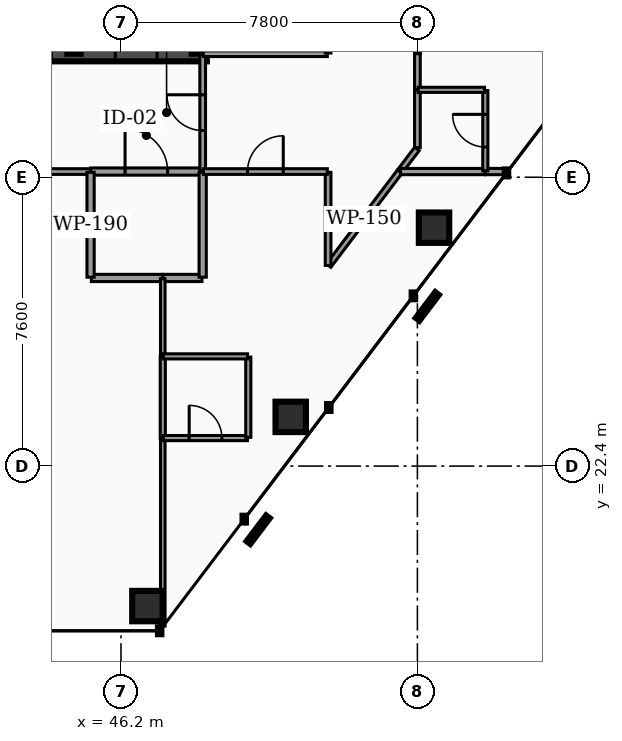
"""IFC4 building model, lengths in metres.
Left out: names, types, materials, properties, quantities, classifications, styles, units other than length and angle.
Written with IfcOpenShell. Run it as: python <this file> out.ifc"""

import sys

from ifc_helpers import new_model, si_unit, direction, frame, frame_2d, origin, origin_2d, place, context, subcontext, project, spatial, rectangle, hollow_rectangle, extrude, element, fill, save


model = new_model("IFC4")
c1 = context("Model", 3, precision=1e-05, world=origin(), true_north=direction((0.0, 1.0)))
c2 = subcontext(c1, "Body", "Model", "MODEL_VIEW")
j1 = project(units=[si_unit("LENGTHUNIT", "METRE"), si_unit("PLANEANGLEUNIT", "RADIAN")], contexts=[c1])
p1 = place(None, origin())
s1 = spatial("IfcSite", under=j1, at=p1, CompositionType="ELEMENT")
p2 = place(p1, origin())
s2 = spatial("IfcBuilding", under=s1, at=p2, CompositionType="ELEMENT")
p3 = place(p2, frame((0.0, 0.0, 127.16)))
s3 = spatial("IfcBuildingStorey", under=s2, at=p3, CompositionType="ELEMENT", Elevation=127.16)
p4 = place(p3, frame((28.4, 33.25, 0.0), z_axis=(0.0, 0.0, 1.0), x_axis=(1.0, 0.0, 0.0)))
e1 = element("IfcWall", 1, at=p4, inside=s3, PredefinedType="SHEAR", context=c2, shape_type="SweptSolid", body=[
    extrude(rectangle(XDim=20.06, YDim=0.4, at=frame_2d((10.03, 0.0))), origin(), (0.0, 0.0, 1.0), 3.5),
])
p5 = place(p4, frame((4.03, 0.0, 0.0)))
e2 = element("IfcOpeningElement", 2, at=p5, cuts=e1, PredefinedType="OPENING", context=c2, shape_type="SweptSolid", body=[
    extrude(rectangle(XDim=1.1, YDim=2.15, at=frame_2d((0.55, 1.075))), frame((0.0, 0.21, 0.0), z_axis=(0.0, -1.0, 0.0), x_axis=(1.0, 0.0, 0.0)), (0.0, 0.0, 1.0), 0.42),
])
p6 = place(p4, frame((14.87, 0.0, 0.0)))
e3 = element("IfcOpeningElement", 3, at=p6, cuts=e1, PredefinedType="OPENING", context=c2, shape_type="SweptSolid", body=[
    extrude(rectangle(XDim=1.1, YDim=2.15, at=frame_2d((0.55, 1.075))), frame((0.0, 0.21, 0.0), z_axis=(0.0, -1.0, 0.0), x_axis=(1.0, 0.0, 0.0)), (0.0, 0.0, 1.0), 0.42),
])
p7 = place(p4, frame((5.95, 0.0, 0.0)))
e4 = element("IfcOpeningElement", 4, at=p7, cuts=e1, PredefinedType="OPENING", context=c2, shape_type="SweptSolid", body=[
    extrude(rectangle(XDim=1.0, YDim=2.1, at=frame_2d((0.5, 1.05))), frame((0.0, 0.21, 0.0), z_axis=(0.0, -1.0, 0.0), x_axis=(1.0, 0.0, 0.0)), (0.0, 0.0, 1.0), 0.42),
])
p8 = place(p4, frame((7.65, 0.0, 0.0)))
e5 = element("IfcOpeningElement", 5, at=p8, cuts=e1, PredefinedType="OPENING", context=c2, shape_type="SweptSolid", body=[
    extrude(rectangle(XDim=1.0, YDim=2.1, at=frame_2d((0.5, 1.05))), frame((0.0, 0.21, 0.0), z_axis=(0.0, -1.0, 0.0), x_axis=(1.0, 0.0, 0.0)), (0.0, 0.0, 1.0), 0.42),
])
p9 = place(p4, frame((1.31, 0.0, 0.0)))
e6 = element("IfcOpeningElement", 6, at=p9, cuts=e1, PredefinedType="OPENING", context=c2, shape_type="SweptSolid", body=[
    extrude(rectangle(XDim=1.1, YDim=2.2, at=frame_2d((0.55, 1.1))), frame((0.0, 0.21, 0.0), z_axis=(0.0, -1.0, 0.0), x_axis=(1.0, 0.0, 0.0)), (0.0, 0.0, 1.0), 0.42),
])
p10 = place(p4, frame((9.44, 0.0, 0.0)))
e7 = element("IfcOpeningElement", 7, at=p10, cuts=e1, PredefinedType="OPENING", context=c2, shape_type="SweptSolid", body=[
    extrude(rectangle(XDim=1.12, YDim=2.05, at=frame_2d((0.56, 1.025))), frame((0.0, 0.21, 0.0), z_axis=(0.0, -1.0, 0.0), x_axis=(1.0, 0.0, 0.0)), (0.0, 0.0, 1.0), 0.42),
])
p11 = place(p4, frame((17.65, 0.0, 0.0)))
e8 = element("IfcOpeningElement", 8, at=p11, cuts=e1, PredefinedType="OPENING", context=c2, shape_type="SweptSolid", body=[
    extrude(rectangle(XDim=1.1, YDim=2.2, at=frame_2d((0.55, 1.1))), frame((0.0, 0.21, 0.0), z_axis=(0.0, -1.0, 0.0), x_axis=(1.0, 0.0, 0.0)), (0.0, 0.0, 1.0), 0.42),
])
p12 = place(p3, frame((44.965, 33.25, 0.0), z_axis=(0.0, 0.0, 1.0), x_axis=(0.0, 1.0, 0.0)))
e9 = element("IfcWall", 9, at=p12, inside=s3, PredefinedType="SHEAR", context=c2, shape_type="SweptSolid", body=[
    extrude(rectangle(XDim=10.2, YDim=0.35, at=frame_2d((5.1, 0.0))), origin(), (0.0, 0.0, 1.0), 3.5),
])
p13 = place(p3, frame((48.26, 33.25, 0.0), z_axis=(0.0, 0.0, 1.0), x_axis=(0.0, 1.0, 0.0)))
e10 = element("IfcWall", 10, at=p13, inside=s3, PredefinedType="SHEAR", context=c2, shape_type="SweptSolid", body=[
    extrude(rectangle(XDim=10.2, YDim=0.4, at=frame_2d((5.1, 0.0))), origin(), (0.0, 0.0, 1.0), 3.5),
])
for number, where, z_axis, x_axis in (
    (11, (46.895, 18.716, 0.0), (0.0, 0.0, 1.0), (1.0, 0.0, 0.0)),
    (12, (50.666, 23.695, 0.0), (0.0, 0.0, 1.0), (1.0, 0.0, 0.0)),
    (13, (54.438, 28.673, 0.0), (0.0, 0.0, 1.0), (1.0, 0.0, 0.0)),
):
    element("IfcColumn", number, at=place(p3, frame(where, z_axis=z_axis, x_axis=x_axis)), inside=s3, PredefinedType="COLUMN", context=c2, shape_type="SweptSolid", body=[
        extrude(hollow_rectangle(XDim=0.8, YDim=0.8, WallThickness=0.04, at=origin_2d()), origin(), (0.0, 0.0, 1.0), 3.5),
    ])
p14 = place(p3, frame((45.405, 30.15, 0.0), z_axis=(0.0, 0.0, 1.0), x_axis=(1.0, 0.0, 0.0)))
e14 = element("IfcWall", 14, at=p14, inside=s3, PredefinedType="PARTITIONING", context=c2, shape_type="SweptSolid", body=[
    extrude(rectangle(XDim=2.925, YDim=0.19, at=frame_2d((1.462, 0.0))), origin(), (0.0, 0.0, 1.0), 2.457),
])
p15 = place(p14, frame((0.903, 0.0, 0.0)))
e15 = element("IfcOpeningElement", 15, at=p15, cuts=e14, PredefinedType="OPENING", context=c2, shape_type="SweptSolid", body=[
    extrude(rectangle(XDim=1.12, YDim=2.05, at=frame_2d((0.56, 1.025))), frame((0.0, 0.105, 0.0), z_axis=(0.0, -1.0, 0.0), x_axis=(1.0, 0.0, 0.0)), (0.0, 0.0, 1.0), 0.21),
])
p16 = place(p3, frame((48.35, 30.17, 0.0), z_axis=(0.0, 0.0, 1.0), x_axis=(0.0, 1.0, 0.0)))
e16 = element("IfcWall", 16, at=p16, inside=s3, PredefinedType="PARTITIONING", context=c2, shape_type="SweptSolid", body=[
    extrude(rectangle(XDim=3.06, YDim=0.15, at=frame_2d((1.53, 0.0))), origin(), (0.0, 0.0, 1.0), 2.457),
])
p17 = place(p16, frame((1.06, 0.0, 0.0)))
e17 = element("IfcOpeningElement", 17, at=p17, cuts=e16, PredefinedType="OPENING", context=c2, shape_type="SweptSolid", body=[
    extrude(rectangle(XDim=0.94, YDim=2.05, at=frame_2d((0.47, 1.025))), frame((0.0, 0.085, 0.0), z_axis=(0.0, -1.0, 0.0), x_axis=(1.0, 0.0, 0.0)), (0.0, 0.0, 1.0), 0.17),
])
p18 = place(p3, frame((35.385, 30.15, 0.0), z_axis=(0.0, 0.0, 1.0), x_axis=(1.0, 0.0, 0.0)))
e18 = element("IfcWall", 18, at=p18, inside=s3, PredefinedType="PARTITIONING", context=c2, shape_type="SweptSolid", body=[
    extrude(rectangle(XDim=10.01, YDim=0.15, at=frame_2d((5.005, 0.0))), origin(), (0.0, 0.0, 1.0), 2.457),
])
p19 = place(p18, frame((7.935, 0.0, 0.0)))
e19 = element("IfcOpeningElement", 19, at=p19, cuts=e18, PredefinedType="OPENING", context=c2, shape_type="SweptSolid", body=[
    extrude(rectangle(XDim=0.94, YDim=2.05, at=frame_2d((0.47, 1.025))), frame((0.0, 0.085, 0.0), z_axis=(0.0, -1.0, 0.0), x_axis=(1.0, 0.0, 0.0)), (0.0, 0.0, 1.0), 0.17),
])
p20 = place(p3, frame((45.42, 27.35, 0.0), z_axis=(0.0, 0.0, 1.0), x_axis=(1.0, 0.0, 0.0)))
e20 = element("IfcWall", 20, at=p20, inside=s3, PredefinedType="PARTITIONING", context=c2, shape_type="SweptSolid", body=[
    extrude(rectangle(XDim=1.875, YDim=0.19, at=frame_2d((0.938, 0.0))), origin(), (0.0, 0.0, 1.0), 2.457),
])
p21 = place(p3, frame((45.4, 27.37, 0.0), z_axis=(0.0, 0.0, 1.0), x_axis=(0.0, 1.0, 0.0)))
e21 = element("IfcWall", 21, at=p21, inside=s3, PredefinedType="PARTITIONING", context=c2, shape_type="SweptSolid", body=[
    extrude(rectangle(XDim=2.76, YDim=0.19, at=frame_2d((1.38, 0.0))), origin(), (0.0, 0.0, 1.0), 2.457),
])
p22 = place(p3, frame((47.305, 27.35, 0.0), z_axis=(0.0, 0.0, 1.0), x_axis=(1.0, 0.0, 0.0)))
e22 = element("IfcWall", 22, at=p22, inside=s3, PredefinedType="PARTITIONING", context=c2, shape_type="SweptSolid", body=[
    extrude(rectangle(XDim=1.025, YDim=0.19, at=frame_2d((0.513, 0.0))), origin(), (0.0, 0.0, 1.0), 2.457),
])
p23 = place(p3, frame((48.35, 27.37, 0.0), z_axis=(0.0, 0.0, 1.0), x_axis=(0.0, 1.0, 0.0)))
e23 = element("IfcWall", 23, at=p23, inside=s3, PredefinedType="PARTITIONING", context=c2, shape_type="SweptSolid", body=[
    extrude(rectangle(XDim=2.76, YDim=0.19, at=frame_2d((1.38, 0.0))), origin(), (0.0, 0.0, 1.0), 2.457),
])
p24 = place(p3, frame((51.662, 27.675, 0.0), z_axis=(0.0, 0.0, 1.0), x_axis=(0.603831940294, 0.797111653334, 0.0)))
e24 = element("IfcWall", 24, at=p24, inside=s3, PredefinedType="PARTITIONING", context=c2, shape_type="SweptSolid", body=[
    extrude(rectangle(XDim=3.104, YDim=0.15, at=frame_2d((1.552, 0.0))), origin(), (0.0, 0.0, 1.0), 2.457),
])
p25 = place(p3, frame((51.65, 27.679, 0.0), z_axis=(0.0, 0.0, 1.0), x_axis=(0.0, 1.0, 0.0)))
e25 = element("IfcWall", 25, at=p25, inside=s3, PredefinedType="PARTITIONING", context=c2, shape_type="SweptSolid", body=[
    extrude(rectangle(XDim=2.451, YDim=0.15, at=frame_2d((1.225, 0.0))), origin(), (0.0, 0.0, 1.0), 2.457),
])
p26 = place(p3, frame((48.37, 30.15, 0.0), z_axis=(0.0, 0.0, 1.0), x_axis=(1.0, 0.0, 0.0)))
e26 = element("IfcWall", 26, at=p26, inside=s3, PredefinedType="PARTITIONING", context=c2, shape_type="SweptSolid", body=[
    extrude(rectangle(XDim=3.26, YDim=0.15, at=frame_2d((1.63, 0.0))), origin(), (0.0, 0.0, 1.0), 2.457),
])
p27 = place(p26, frame((1.16, 0.0, 0.0)))
e27 = element("IfcOpeningElement", 27, at=p27, cuts=e26, PredefinedType="OPENING", context=c2, shape_type="SweptSolid", body=[
    extrude(rectangle(XDim=0.94, YDim=2.05, at=frame_2d((0.47, 1.025))), frame((0.0, 0.085, 0.0), z_axis=(0.0, -1.0, 0.0), x_axis=(1.0, 0.0, 0.0)), (0.0, 0.0, 1.0), 0.17),
])
p28 = place(p3, frame((54.0, 33.25, 0.0), z_axis=(0.0, 0.0, 1.0), x_axis=(0.0, 1.0, 0.0)))
e28 = element("IfcWall", 28, at=p28, inside=s3, PredefinedType="PARTITIONING", context=c2, shape_type="SweptSolid", body=[
    extrude(rectangle(XDim=6.423, YDim=0.15, at=frame_2d((3.212, 0.0))), origin(), (0.0, 0.0, 1.0), 2.457),
])
p29 = place(p28, frame((2.742, 0.0, 0.0)))
e29 = element("IfcOpeningElement", 29, at=p29, cuts=e28, PredefinedType="OPENING", context=c2, shape_type="SweptSolid", body=[
    extrude(rectangle(XDim=0.94, YDim=2.05, at=frame_2d((0.47, 1.025))), frame((0.0, 0.085, 0.0), z_axis=(0.0, -1.0, 0.0), x_axis=(1.0, 0.0, 0.0)), (0.0, 0.0, 1.0), 0.17),
])
p30 = place(p3, frame((54.0, 32.305, 0.0), z_axis=(0.0, 0.0, 1.0), x_axis=(0.0, 1.0, 0.0)))
e30 = element("IfcWall", 30, at=p30, inside=s3, PredefinedType="PARTITIONING", context=c2, shape_type="SweptSolid", body=[
    extrude(rectangle(XDim=0.945, YDim=0.15, at=frame_2d((0.473, 0.0))), origin(), (0.0, 0.0, 1.0), 2.457),
])
p31 = place(p3, frame((54.0, 30.781, 0.0), z_axis=(0.0, 0.0, 1.0), x_axis=(0.0, 1.0, 0.0)))
e31 = element("IfcWall", 31, at=p31, inside=s3, PredefinedType="PARTITIONING", context=c2, shape_type="SweptSolid", body=[
    extrude(rectangle(XDim=1.514, YDim=0.15, at=frame_2d((0.757, 0.0))), origin(), (0.0, 0.0, 1.0), 2.457),
])
p32 = place(p3, frame((53.54, 30.154, 0.0), z_axis=(0.0, 0.0, 1.0), x_axis=(0.603680225987, 0.797226557982, 0.0)))
e32 = element("IfcWall", 32, at=p32, inside=s3, PredefinedType="PARTITIONING", context=c2, shape_type="SweptSolid", body=[
    extrude(rectangle(XDim=0.742, YDim=0.15, at=frame_2d((0.371, 0.0))), origin(), (0.0, 0.0, 1.0), 2.457),
])
p33 = place(p3, frame((48.365, 33.25, 0.0), z_axis=(0.0, 0.0, 1.0), x_axis=(1.0, 0.0, 0.0)))
e33 = element("IfcWall", 33, at=p33, inside=s3, PredefinedType="PARTITIONING", context=c2, shape_type="SweptSolid", body=[
    extrude(rectangle(XDim=3.265, YDim=0.15, at=frame_2d((1.632, 0.0))), origin(), (0.0, 0.0, 1.0), 2.457),
])
p34 = place(p3, frame((51.65, 33.27, 0.0), z_axis=(0.0, 0.0, 1.0), x_axis=(0.0, 1.0, 0.0)))
e34 = element("IfcWall", 34, at=p34, inside=s3, PredefinedType="PARTITIONING", context=c2, shape_type="SweptSolid", body=[
    extrude(rectangle(XDim=1.969, YDim=0.15, at=frame_2d((0.985, 0.0))), origin(), (0.0, 0.0, 1.0), 2.457),
])
p35 = place(p3, frame((47.3, 25.292, 0.0), z_axis=(0.0, 0.0, 1.0), x_axis=(0.0, 1.0, 0.0)))
e35 = element("IfcWall", 35, at=p35, inside=s3, PredefinedType="PARTITIONING", context=c2, shape_type="SweptSolid", body=[
    extrude(rectangle(XDim=2.038, YDim=0.12, at=frame_2d((1.019, 0.0))), origin(), (0.0, 0.0, 1.0), 2.457),
])
p36 = place(p3, frame((47.3, 18.19, 0.0), z_axis=(0.0, 0.0, 1.0), x_axis=(0.0, 1.0, 0.0)))
e36 = element("IfcWall", 36, at=p36, inside=s3, PredefinedType="PARTITIONING", context=c2, shape_type="SweptSolid", body=[
    extrude(rectangle(XDim=4.942, YDim=0.12, at=frame_2d((2.471, 0.0))), origin(), (0.0, 0.0, 1.0), 2.457),
])
p37 = place(p3, frame((47.3, 23.142, 0.0), z_axis=(0.0, 0.0, 1.0), x_axis=(0.0, 1.0, 0.0)))
e37 = element("IfcWall", 37, at=p37, inside=s3, PredefinedType="PARTITIONING", context=c2, shape_type="SweptSolid", body=[
    extrude(rectangle(XDim=2.14, YDim=0.135, at=frame_2d((1.07, 0.0))), origin(), (0.0, 0.0, 1.0), 2.457),
])
p38 = place(p3, frame((47.32, 23.137, 0.0), z_axis=(0.0, 0.0, 1.0), x_axis=(1.0, 0.0, 0.0)))
e38 = element("IfcWall", 38, at=p38, inside=s3, PredefinedType="PARTITIONING", context=c2, shape_type="SweptSolid", body=[
    extrude(rectangle(XDim=2.21, YDim=0.135, at=frame_2d((1.105, 0.0))), origin(), (0.0, 0.0, 1.0), 2.457),
])
p39 = place(p38, frame((0.675, 0.0, 0.0)))
e39 = element("IfcOpeningElement", 39, at=p39, cuts=e38, PredefinedType="OPENING", context=c2, shape_type="SweptSolid", body=[
    extrude(rectangle(XDim=0.86, YDim=2.05, at=frame_2d((0.43, 1.025))), frame((0.0, 0.077, 0.0), z_axis=(0.0, -1.0, 0.0), x_axis=(1.0, 0.0, 0.0)), (0.0, 0.0, 1.0), 0.155),
])
p40 = place(p3, frame((49.55, 23.157, 0.0), z_axis=(0.0, 0.0, 1.0), x_axis=(0.0, 1.0, 0.0)))
e40 = element("IfcWall", 40, at=p40, inside=s3, PredefinedType="PARTITIONING", context=c2, shape_type="SweptSolid", body=[
    extrude(rectangle(XDim=2.11, YDim=0.135, at=frame_2d((1.055, 0.0))), origin(), (0.0, 0.0, 1.0), 2.457),
])
p41 = place(p3, frame((47.32, 25.287, 0.0), z_axis=(0.0, 0.0, 1.0), x_axis=(1.0, 0.0, 0.0)))
e41 = element("IfcWall", 41, at=p41, inside=s3, PredefinedType="PARTITIONING", context=c2, shape_type="SweptSolid", body=[
    extrude(rectangle(XDim=2.21, YDim=0.135, at=frame_2d((1.105, 0.0))), origin(), (0.0, 0.0, 1.0), 2.457),
])
p42 = place(p3, frame((55.792, 30.15, 0.0), z_axis=(0.0, 0.0, 1.0), x_axis=(1.0, 0.0, 0.0)))
e42 = element("IfcWall", 42, at=p42, inside=s3, PredefinedType="PARTITIONING", context=c2, shape_type="SweptSolid", body=[
    extrude(rectangle(XDim=0.565, YDim=0.165, at=frame_2d((0.283, 0.0))), origin(), (0.0, 0.0, 1.0), 2.457),
])
p43 = place(p3, frame((53.557, 30.15, 0.0), z_axis=(0.0, 0.0, 1.0), x_axis=(1.0, 0.0, 0.0)))
e43 = element("IfcWall", 43, at=p43, inside=s3, PredefinedType="PARTITIONING", context=c2, shape_type="SweptSolid", body=[
    extrude(rectangle(XDim=2.225, YDim=0.165, at=frame_2d((1.113, 0.0))), origin(), (0.0, 0.0, 1.0), 2.457),
])
p44 = place(p3, frame((55.787, 30.17, 0.0), z_axis=(0.0, 0.0, 1.0), x_axis=(0.0, 1.0, 0.0)))
e44 = element("IfcWall", 44, at=p44, inside=s3, PredefinedType="PARTITIONING", context=c2, shape_type="SweptSolid", body=[
    extrude(rectangle(XDim=2.11, YDim=0.135, at=frame_2d((1.055, 0.0))), origin(), (0.0, 0.0, 1.0), 2.457),
])
p45 = place(p44, frame((0.625, 0.0, 0.0)))
e45 = element("IfcOpeningElement", 45, at=p45, cuts=e44, PredefinedType="OPENING", context=c2, shape_type="SweptSolid", body=[
    extrude(rectangle(XDim=0.86, YDim=2.05, at=frame_2d((0.43, 1.025))), frame((0.0, 0.077, 0.0), z_axis=(0.0, -1.0, 0.0), x_axis=(1.0, 0.0, 0.0)), (0.0, 0.0, 1.0), 0.155),
])
p46 = place(p3, frame((54.02, 32.3, 0.0), z_axis=(0.0, 0.0, 1.0), x_axis=(1.0, 0.0, 0.0)))
e46 = element("IfcWall", 46, at=p46, inside=s3, PredefinedType="PARTITIONING", context=c2, shape_type="SweptSolid", body=[
    extrude(rectangle(XDim=1.747, YDim=0.135, at=frame_2d((0.874, 0.0))), origin(), (0.0, 0.0, 1.0), 2.457),
])
p47 = place(p11, origin())
e47 = element("IfcDoor", 47, at=p47, inside=s3, OperationType="SINGLE_SWING_RIGHT", PredefinedType="DOOR", context=c2, shape_type="SweptSolid", body=[
    extrude(rectangle(XDim=1.1, YDim=2.2, at=frame_2d((0.55, 1.1))), frame((0.0, 0.025, 0.0), z_axis=(0.0, -1.0, 0.0), x_axis=(1.0, 0.0, 0.0)), (0.0, 0.0, 1.0), 0.05),
])
fill(e8, e47)
p48 = place(p15, origin())
e48 = element("IfcDoor", 48, at=p48, inside=s3, OperationType="SINGLE_SWING_LEFT", PredefinedType="DOOR", context=c2, shape_type="SweptSolid", body=[
    extrude(rectangle(XDim=1.12, YDim=2.05, at=frame_2d((0.56, 1.025))), frame((0.0, 0.025, 0.0), z_axis=(0.0, -1.0, 0.0), x_axis=(1.0, 0.0, 0.0)), (0.0, 0.0, 1.0), 0.05),
])
fill(e15, e48)
p49 = place(p17, origin())
e49 = element("IfcDoor", 49, at=p49, inside=s3, OperationType="SINGLE_SWING_RIGHT", PredefinedType="DOOR", context=c2, shape_type="SweptSolid", body=[
    extrude(rectangle(XDim=0.94, YDim=2.05, at=frame_2d((0.47, 1.025))), frame((0.0, 0.025, 0.0), z_axis=(0.0, -1.0, 0.0), x_axis=(1.0, 0.0, 0.0)), (0.0, 0.0, 1.0), 0.05),
])
fill(e17, e49)
p50 = place(p27, origin())
e50 = element("IfcDoor", 50, at=p50, inside=s3, OperationType="SINGLE_SWING_RIGHT", PredefinedType="DOOR", context=c2, shape_type="SweptSolid", body=[
    extrude(rectangle(XDim=0.94, YDim=2.05, at=frame_2d((0.47, 1.025))), frame((0.0, 0.025, 0.0), z_axis=(0.0, -1.0, 0.0), x_axis=(1.0, 0.0, 0.0)), (0.0, 0.0, 1.0), 0.05),
])
fill(e27, e50)
p51 = place(p39, origin())
e51 = element("IfcDoor", 51, at=p51, inside=s3, OperationType="SINGLE_SWING_LEFT", PredefinedType="DOOR", context=c2, shape_type="SweptSolid", body=[
    extrude(rectangle(XDim=0.86, YDim=2.05, at=frame_2d((0.43, 1.025))), frame((0.0, 0.025, 0.0), z_axis=(0.0, -1.0, 0.0), x_axis=(1.0, 0.0, 0.0)), (0.0, 0.0, 1.0), 0.05),
])
fill(e39, e51)
p52 = place(p45, origin())
e52 = element("IfcDoor", 52, at=p52, inside=s3, OperationType="SINGLE_SWING_RIGHT", PredefinedType="DOOR", context=c2, shape_type="SweptSolid", body=[
    extrude(rectangle(XDim=0.86, YDim=2.05, at=frame_2d((0.43, 1.025))), frame((0.0, 0.025, 0.0), z_axis=(0.0, -1.0, 0.0), x_axis=(1.0, 0.0, 0.0)), (0.0, 0.0, 1.0), 0.05),
])
fill(e45, e52)
save(model, sys.argv[1])
